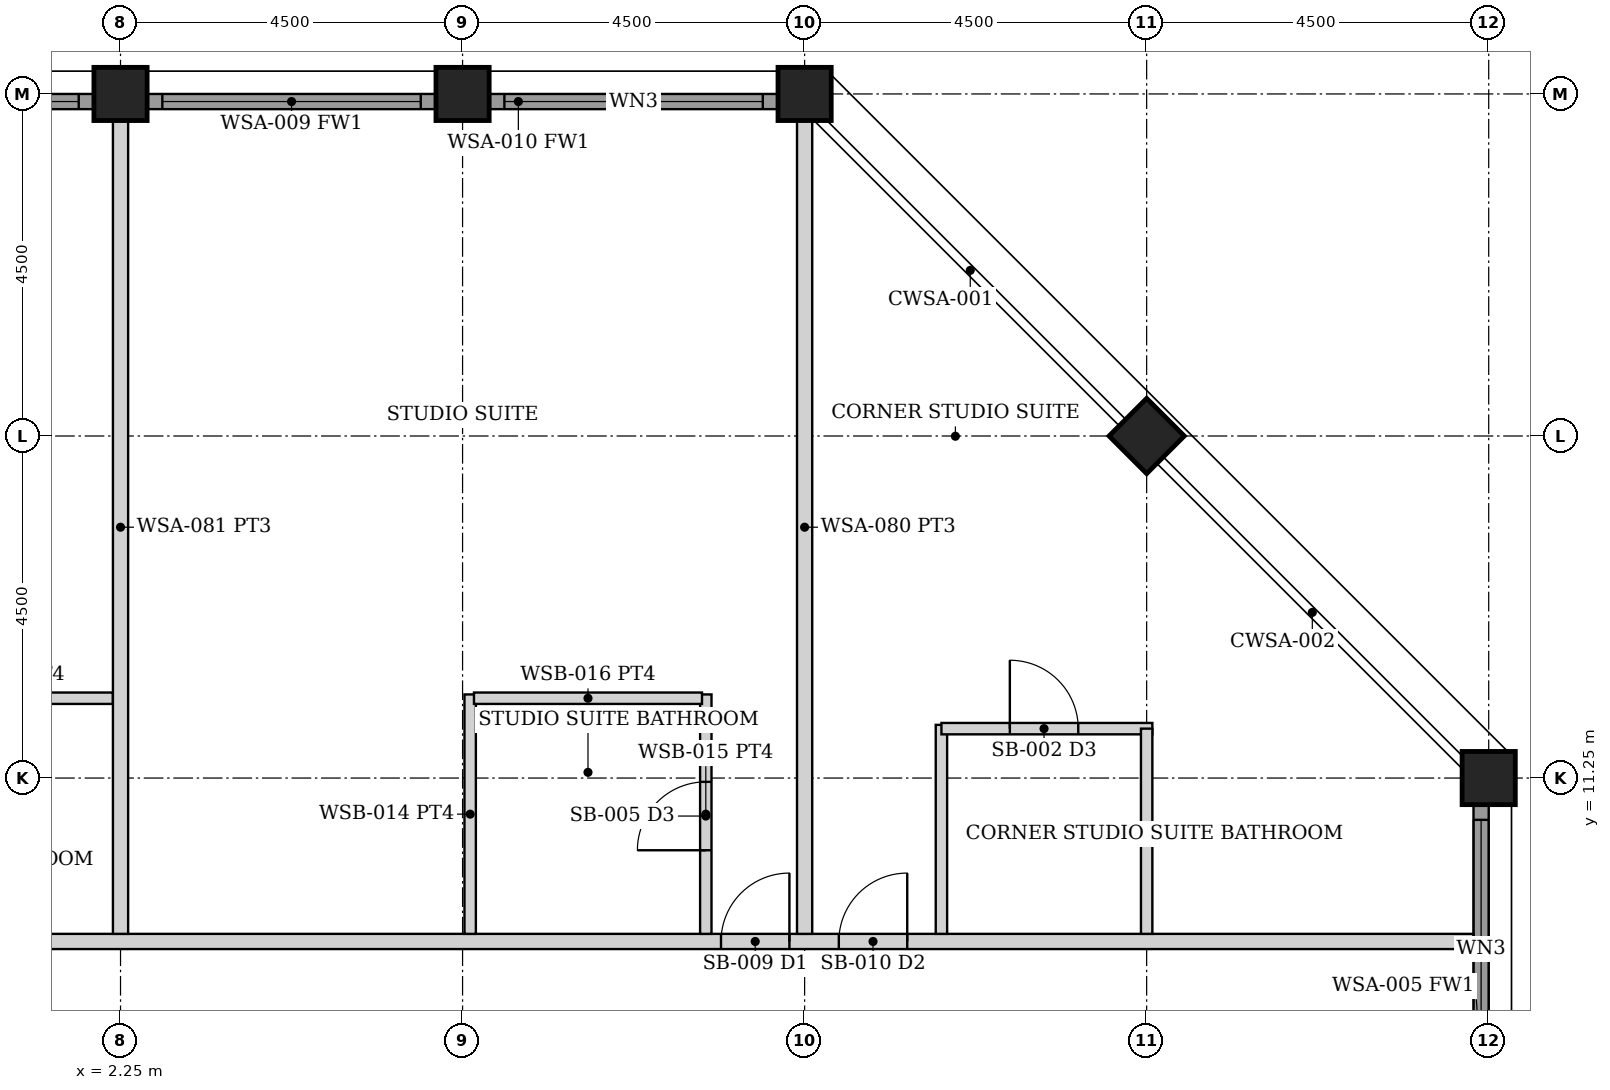
"""IFC4 building model, lengths in metres.
Left out: names, types, materials, properties, quantities, classifications, styles, units other than length and angle.
Written with IfcOpenShell. Run it as: python <this file> out.ifc"""

import sys

from ifc_helpers import new_model, si_unit, direction, frame, frame_2d, origin, origin_2d, place, context, subcontext, project, spatial, rectangle, hollow_rectangle, extrude, element, fill, save


model = new_model("IFC4")
c1 = context("Model", 3, precision=1e-05, world=origin(), true_north=direction((0.0, 1.0)))
c2 = subcontext(c1, "Body", "Model", "MODEL_VIEW")
j1 = project(units=[si_unit("LENGTHUNIT", "METRE"), si_unit("PLANEANGLEUNIT", "RADIAN")], contexts=[c1])
p1 = place(None, origin())
s1 = spatial("IfcSite", under=j1, at=p1, CompositionType="ELEMENT")
p2 = place(p1, origin())
s2 = spatial("IfcBuilding", under=s1, at=p2, CompositionType="ELEMENT")
p3 = place(p2, frame((0.0, 0.0, 212.05)))
s3 = spatial("IfcBuildingStorey", under=s2, at=p3, CompositionType="ELEMENT", Elevation=212.05)
for number, where, z_axis, x_axis in (
    (1, (2.25, 20.25, 0.0), (0.0, 0.0, 1.0), (0.0, 1.0, 0.0)),
    (2, (6.75, 20.25, 0.0), (0.0, 0.0, 1.0), (0.0, 1.0, 0.0)),
    (3, (11.25, 20.25, 0.0), (0.0, 0.0, 1.0), (0.0, 1.0, 0.0)),
    (4, (20.25, 11.25, 0.0), (0.0, 0.0, 1.0), (1.0, 0.0, 0.0)),
    (5, (15.75, 15.75, 0.0), (0.0, 0.0, 1.0), (0.707, 0.707, 0.0)),
):
    element("IfcColumn", number, at=place(p3, frame(where, z_axis=z_axis, x_axis=x_axis)), inside=s3, PredefinedType="COLUMN", context=c2, shape_type="SweptSolid", body=[
        extrude(hollow_rectangle(XDim=0.7, YDim=0.7, WallThickness=0.045, at=origin_2d()), origin(), (0.0, 0.0, 1.0), 3.75),
    ])
p4 = place(p3, frame((20.15, 7.105, 0.0), z_axis=(0.0, 0.0, 1.0), x_axis=(0.0, 1.0, 0.0)))
e6 = element("IfcWall", 6, at=p4, inside=s3, PredefinedType="SOLIDWALL", context=c2, shape_type="SweptSolid", body=[
    extrude(rectangle(XDim=3.79, YDim=0.2, at=frame_2d((1.895, 0.0))), origin(), (0.0, 0.0, 1.0), 2.629),
])
p5 = place(p4, frame((0.195, 0.0, 0.3)))
e7 = element("IfcOpeningElement", 7, at=p5, cuts=e6, PredefinedType="OPENING", context=c2, shape_type="SweptSolid", body=[
    extrude(rectangle(XDim=3.4, YDim=2.179, at=frame_2d((1.7, 1.089))), frame((0.0, 0.11, 0.0), z_axis=(0.0, -1.0, 0.0), x_axis=(1.0, 0.0, 0.0)), (0.0, 0.0, 1.0), 0.22),
])
p6 = place(p3, frame((-1.895, 20.15, 0.0), z_axis=(0.0, 0.0, 1.0), x_axis=(1.0, 0.0, 0.0)))
e8 = element("IfcWall", 8, at=p6, inside=s3, PredefinedType="SOLIDWALL", context=c2, shape_type="SweptSolid", body=[
    extrude(rectangle(XDim=3.79, YDim=0.2, at=frame_2d((1.895, 0.0))), origin(), (0.0, 0.0, 1.0), 2.629),
])
p7 = place(p6, frame((0.195, 0.0, 0.3)))
e9 = element("IfcOpeningElement", 9, at=p7, cuts=e8, PredefinedType="OPENING", context=c2, shape_type="SweptSolid", body=[
    extrude(rectangle(XDim=3.4, YDim=2.179, at=frame_2d((1.7, 1.089))), frame((0.0, 0.11, 0.0), z_axis=(0.0, -1.0, 0.0), x_axis=(1.0, 0.0, 0.0)), (0.0, 0.0, 1.0), 0.22),
])
p8 = place(p3, frame((2.605, 20.15, 0.0), z_axis=(0.0, 0.0, 1.0), x_axis=(1.0, 0.0, 0.0)))
e10 = element("IfcWall", 10, at=p8, inside=s3, PredefinedType="SOLIDWALL", context=c2, shape_type="SweptSolid", body=[
    extrude(rectangle(XDim=3.79, YDim=0.2, at=frame_2d((1.895, 0.0))), origin(), (0.0, 0.0, 1.0), 2.629),
])
p9 = place(p8, frame((0.195, 0.0, 0.3)))
e11 = element("IfcOpeningElement", 11, at=p9, cuts=e10, PredefinedType="OPENING", context=c2, shape_type="SweptSolid", body=[
    extrude(rectangle(XDim=3.4, YDim=2.179, at=frame_2d((1.7, 1.089))), frame((0.0, 0.11, 0.0), z_axis=(0.0, -1.0, 0.0), x_axis=(1.0, 0.0, 0.0)), (0.0, 0.0, 1.0), 0.22),
])
p10 = place(p3, frame((7.105, 20.15, 0.0), z_axis=(0.0, 0.0, 1.0), x_axis=(1.0, 0.0, 0.0)))
e12 = element("IfcWall", 12, at=p10, inside=s3, PredefinedType="SOLIDWALL", context=c2, shape_type="SweptSolid", body=[
    extrude(rectangle(XDim=3.79, YDim=0.2, at=frame_2d((1.895, 0.0))), origin(), (0.0, 0.0, 1.0), 2.629),
])
p11 = place(p10, frame((0.195, 0.0, 0.3)))
e13 = element("IfcOpeningElement", 13, at=p11, cuts=e12, PredefinedType="OPENING", context=c2, shape_type="SweptSolid", body=[
    extrude(rectangle(XDim=3.4, YDim=2.179, at=frame_2d((1.7, 1.089))), frame((0.0, 0.11, 0.0), z_axis=(0.0, -1.0, 0.0), x_axis=(1.0, 0.0, 0.0)), (0.0, 0.0, 1.0), 0.22),
])
p12 = place(p3, frame((-20.05, 9.1, 0.0), z_axis=(0.0, 0.0, 1.0), x_axis=(1.0, 0.0, 0.0)))
e14 = element("IfcWall", 14, at=p12, inside=s3, PredefinedType="PARTITIONING", context=c2, shape_type="SweptSolid", body=[
    extrude(rectangle(XDim=40.1, YDim=0.2, at=frame_2d((20.05, 0.0))), origin(), (0.0, 0.0, 1.0), 2.629),
])
p13 = place(p12, frame((9.0, 0.0, 0.0)))
e15 = element("IfcOpeningElement", 15, at=p13, cuts=e14, PredefinedType="OPENING", context=c2, shape_type="SweptSolid", body=[
    extrude(rectangle(XDim=0.9, YDim=2.1, at=frame_2d((0.45, 1.05))), frame((0.0, 0.11, 0.0), z_axis=(0.0, -1.0, 0.0), x_axis=(1.0, 0.0, 0.0)), (0.0, 0.0, 1.0), 0.22),
])
p14 = place(p12, frame((18.0, 0.0, 0.0)))
e16 = element("IfcOpeningElement", 16, at=p14, cuts=e14, PredefinedType="OPENING", context=c2, shape_type="SweptSolid", body=[
    extrude(rectangle(XDim=0.9, YDim=2.1, at=frame_2d((0.45, 1.05))), frame((0.0, 0.11, 0.0), z_axis=(0.0, -1.0, 0.0), x_axis=(1.0, 0.0, 0.0)), (0.0, 0.0, 1.0), 0.22),
])
p15 = place(p12, frame((30.2, 0.0, 0.0)))
e17 = element("IfcOpeningElement", 17, at=p15, cuts=e14, PredefinedType="OPENING", context=c2, shape_type="SweptSolid", body=[
    extrude(rectangle(XDim=0.9, YDim=2.1, at=frame_2d((0.45, 1.05))), frame((0.0, 0.11, 0.0), z_axis=(0.0, -1.0, 0.0), x_axis=(1.0, 0.0, 0.0)), (0.0, 0.0, 1.0), 0.22),
])
p16 = place(p12, frame((31.75, 0.0, 0.0)))
e18 = element("IfcOpeningElement", 18, at=p16, cuts=e14, PredefinedType="OPENING", context=c2, shape_type="SweptSolid", body=[
    extrude(rectangle(XDim=0.9, YDim=2.1, at=frame_2d((0.45, 1.05))), frame((0.0, 0.11, 0.0), z_axis=(0.0, -1.0, 0.0), x_axis=(1.0, 0.0, 0.0)), (0.0, 0.0, 1.0), 0.22),
])
p17 = place(p12, frame((7.45, 0.0, 0.0)))
e19 = element("IfcOpeningElement", 19, at=p17, cuts=e14, PredefinedType="OPENING", context=c2, shape_type="SweptSolid", body=[
    extrude(rectangle(XDim=0.9, YDim=2.1, at=frame_2d((0.45, 1.05))), frame((0.0, 0.11, 0.0), z_axis=(0.0, -1.0, 0.0), x_axis=(1.0, 0.0, 0.0)), (0.0, 0.0, 1.0), 0.22),
])
p18 = place(p3, frame((-0.9, 12.3, 0.0), z_axis=(0.0, 0.0, 1.0), x_axis=(1.0, 0.0, 0.0)))
e20 = element("IfcWall", 20, at=p18, inside=s3, PredefinedType="PARTITIONING", context=c2, shape_type="SweptSolid", body=[
    extrude(rectangle(XDim=3.05, YDim=0.15, at=frame_2d((1.525, 0.0))), origin(), (0.0, 0.0, 1.0), 2.629),
])
p19 = place(p3, frame((9.95, 9.2, 0.0), z_axis=(0.0, 0.0, 1.0), x_axis=(0.0, 1.0, 0.0)))
e21 = element("IfcWall", 21, at=p19, inside=s3, PredefinedType="PARTITIONING", context=c2, shape_type="SweptSolid", body=[
    extrude(rectangle(XDim=3.15, YDim=0.15, at=frame_2d((1.575, 0.0))), origin(), (0.0, 0.0, 1.0), 2.629),
])
p20 = place(p19, frame((1.1, 0.0, 0.0)))
e22 = element("IfcOpeningElement", 22, at=p20, cuts=e21, PredefinedType="OPENING", context=c2, shape_type="SweptSolid", body=[
    extrude(rectangle(XDim=0.9, YDim=2.1, at=frame_2d((0.45, 1.05))), frame((0.0, 0.085, 0.0), z_axis=(0.0, -1.0, 0.0), x_axis=(1.0, 0.0, 0.0)), (0.0, 0.0, 1.0), 0.17),
])
p21 = place(p3, frame((6.85, 9.2, 0.0), z_axis=(0.0, 0.0, 1.0), x_axis=(0.0, 1.0, 0.0)))
e23 = element("IfcWall", 23, at=p21, inside=s3, PredefinedType="PARTITIONING", context=c2, shape_type="SweptSolid", body=[
    extrude(rectangle(XDim=3.15, YDim=0.15, at=frame_2d((1.575, 0.0))), origin(), (0.0, 0.0, 1.0), 2.629),
])
p22 = place(p3, frame((6.9, 12.3, 0.0), z_axis=(0.0, 0.0, 1.0), x_axis=(1.0, 0.0, 0.0)))
e24 = element("IfcWall", 24, at=p22, inside=s3, PredefinedType="PARTITIONING", context=c2, shape_type="SweptSolid", body=[
    extrude(rectangle(XDim=3.0, YDim=0.15, at=frame_2d((1.5, 0.0))), origin(), (0.0, 0.0, 1.0), 2.629),
])
for number, where, z_axis, x_axis in (
    (25, (2.25, 9.2, 0.0), (0.0, 0.0, 1.0), (0.0, 1.0, 0.0)),
    (26, (11.25, 9.2, 0.0), (0.0, 0.0, 1.0), (0.0, 1.0, 0.0)),
):
    element("IfcWall", number, at=place(p3, frame(where, z_axis=z_axis, x_axis=x_axis)), inside=s3, PredefinedType="PARTITIONING", context=c2, shape_type="SweptSolid", body=[
        extrude(rectangle(XDim=10.7, YDim=0.2, at=frame_2d((5.35, 0.0))), origin(), (0.0, 0.0, 1.0), 2.629),
    ])
p23 = place(p3, frame((13.05, 9.2, 0.0), z_axis=(0.0, 0.0, 1.0), x_axis=(0.0, 1.0, 0.0)))
e27 = element("IfcWall", 27, at=p23, inside=s3, PredefinedType="PARTITIONING", context=c2, shape_type="SweptSolid", body=[
    extrude(rectangle(XDim=2.75, YDim=0.15, at=frame_2d((1.375, 0.0))), origin(), (0.0, 0.0, 1.0), 2.629),
])
p24 = place(p3, frame((13.05, 11.9, 0.0), z_axis=(0.0, 0.0, 1.0), x_axis=(1.0, 0.0, 0.0)))
e28 = element("IfcWall", 28, at=p24, inside=s3, PredefinedType="PARTITIONING", context=c2, shape_type="SweptSolid", body=[
    extrude(rectangle(XDim=2.775, YDim=0.15, at=frame_2d((1.387, 0.0))), origin(), (0.0, 0.0, 1.0), 2.629),
])
p25 = place(p24, frame((0.9, 0.0, 0.0)))
e29 = element("IfcOpeningElement", 29, at=p25, cuts=e28, PredefinedType="OPENING", context=c2, shape_type="SweptSolid", body=[
    extrude(rectangle(XDim=0.9, YDim=2.1, at=frame_2d((0.45, 1.05))), frame((0.0, 0.085, 0.0), z_axis=(0.0, -1.0, 0.0), x_axis=(1.0, 0.0, 0.0)), (0.0, 0.0, 1.0), 0.17),
])
p26 = place(p3, frame((15.75, 9.2, 0.0), z_axis=(0.0, 0.0, 1.0), x_axis=(0.0, 1.0, 0.0)))
e30 = element("IfcWall", 30, at=p26, inside=s3, PredefinedType="PARTITIONING", context=c2, shape_type="SweptSolid", body=[
    extrude(rectangle(XDim=2.7, YDim=0.15, at=frame_2d((1.35, 0.0))), origin(), (0.0, 0.0, 1.0), 2.629),
])
p27 = place(p5, origin())
e31 = element("IfcWindow", 31, at=p27, inside=s3, PartitioningType="SINGLE_PANEL", PredefinedType="WINDOW", context=c2, shape_type="SweptSolid", body=[
    extrude(rectangle(XDim=3.4, YDim=2.179, at=frame_2d((1.7, 1.089))), frame((0.0, 0.03, 0.0), z_axis=(0.0, -1.0, 0.0), x_axis=(1.0, 0.0, 0.0)), (0.0, 0.0, 1.0), 0.06),
])
fill(e7, e31)
p28 = place(p7, origin())
e32 = element("IfcWindow", 32, at=p28, inside=s3, PartitioningType="SINGLE_PANEL", PredefinedType="WINDOW", context=c2, shape_type="SweptSolid", body=[
    extrude(rectangle(XDim=3.4, YDim=2.179, at=frame_2d((1.7, 1.089))), frame((0.0, 0.03, 0.0), z_axis=(0.0, -1.0, 0.0), x_axis=(1.0, 0.0, 0.0)), (0.0, 0.0, 1.0), 0.06),
])
fill(e9, e32)
p29 = place(p9, origin())
e33 = element("IfcWindow", 33, at=p29, inside=s3, PartitioningType="SINGLE_PANEL", PredefinedType="WINDOW", context=c2, shape_type="SweptSolid", body=[
    extrude(rectangle(XDim=3.4, YDim=2.179, at=frame_2d((1.7, 1.089))), frame((0.0, 0.03, 0.0), z_axis=(0.0, -1.0, 0.0), x_axis=(1.0, 0.0, 0.0)), (0.0, 0.0, 1.0), 0.06),
])
fill(e11, e33)
p30 = place(p11, origin())
e34 = element("IfcWindow", 34, at=p30, inside=s3, PartitioningType="SINGLE_PANEL", PredefinedType="WINDOW", context=c2, shape_type="SweptSolid", body=[
    extrude(rectangle(XDim=3.4, YDim=2.179, at=frame_2d((1.7, 1.089))), frame((0.0, 0.03, 0.0), z_axis=(0.0, -1.0, 0.0), x_axis=(1.0, 0.0, 0.0)), (0.0, 0.0, 1.0), 0.06),
])
fill(e13, e34)
p31 = place(p15, origin())
e35 = element("IfcDoor", 35, at=p31, inside=s3, OperationType="SINGLE_SWING_RIGHT", PredefinedType="DOOR", context=c2, shape_type="SweptSolid", body=[
    extrude(rectangle(XDim=0.9, YDim=2.1, at=frame_2d((0.45, 1.05))), frame((0.0, 0.025, 0.0), z_axis=(0.0, -1.0, 0.0), x_axis=(1.0, 0.0, 0.0)), (0.0, 0.0, 1.0), 0.05),
])
fill(e17, e35)
p32 = place(p20, origin())
e36 = element("IfcDoor", 36, at=p32, inside=s3, OperationType="SINGLE_SWING_LEFT", PredefinedType="DOOR", context=c2, shape_type="SweptSolid", body=[
    extrude(rectangle(XDim=0.9, YDim=2.1, at=frame_2d((0.45, 1.05))), frame((0.0, 0.025, 0.0), z_axis=(0.0, -1.0, 0.0), x_axis=(1.0, 0.0, 0.0)), (0.0, 0.0, 1.0), 0.05),
])
fill(e22, e36)
p33 = place(p16, origin())
e37 = element("IfcDoor", 37, at=p33, inside=s3, OperationType="SINGLE_SWING_RIGHT", PredefinedType="DOOR", context=c2, shape_type="SweptSolid", body=[
    extrude(rectangle(XDim=0.9, YDim=2.1, at=frame_2d((0.45, 1.05))), frame((0.0, 0.025, 0.0), z_axis=(0.0, -1.0, 0.0), x_axis=(1.0, 0.0, 0.0)), (0.0, 0.0, 1.0), 0.05),
])
fill(e18, e37)
p34 = place(p25, origin())
e38 = element("IfcDoor", 38, at=p34, inside=s3, OperationType="SINGLE_SWING_LEFT", PredefinedType="DOOR", context=c2, shape_type="SweptSolid", body=[
    extrude(rectangle(XDim=0.9, YDim=2.1, at=frame_2d((0.45, 1.05))), frame((0.0, 0.025, 0.0), z_axis=(0.0, -1.0, 0.0), x_axis=(1.0, 0.0, 0.0)), (0.0, 0.0, 1.0), 0.05),
])
fill(e29, e38)
save(model, sys.argv[1])
